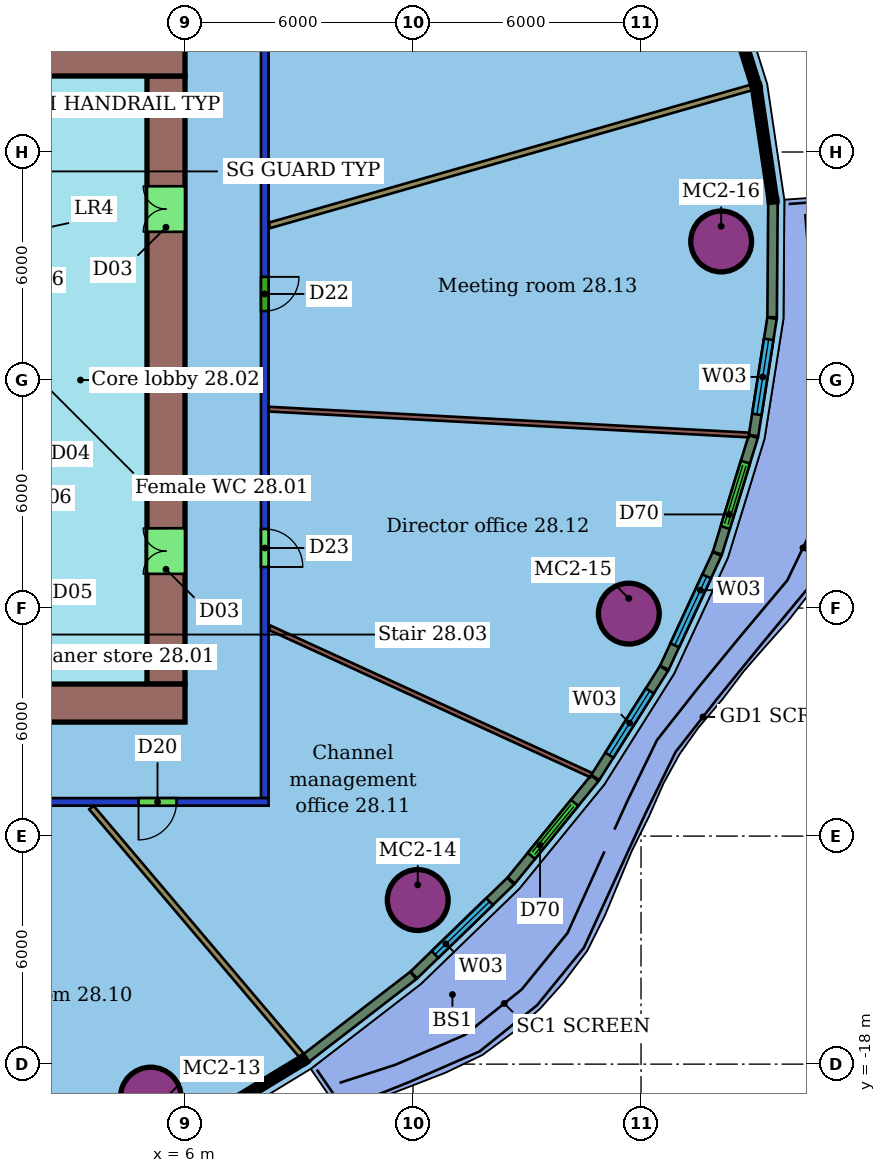
"""IFC4 building model, lengths in metres.
Left out: names, types, materials, properties, quantities, classifications, styles, units other than length and angle.
Written with IfcOpenShell. Run it as: python <this file> out.ifc"""

import sys

from ifc_helpers import new_model, si_unit, direction, frame, frame_2d, origin, origin_2d, place, context, subcontext, project, spatial, rectangle, hollow_circle, extrude, element, fill, save


model = new_model("IFC4")
c1 = context("Model", 3, precision=1e-05, world=origin(), true_north=direction((0.0, 1.0)))
c2 = subcontext(c1, "Body", "Model", "MODEL_VIEW")
j1 = project(units=[si_unit("LENGTHUNIT", "METRE"), si_unit("PLANEANGLEUNIT", "RADIAN")], contexts=[c1])
p1 = place(None, origin())
s1 = spatial("IfcSite", under=j1, at=p1, CompositionType="ELEMENT")
p2 = place(p1, origin())
s2 = spatial("IfcBuilding", under=s1, at=p2, CompositionType="ELEMENT")
p3 = place(p2, frame((0.0, 0.0, 121.0)))
s3 = spatial("IfcBuildingStorey", under=s2, at=p3, CompositionType="ELEMENT", Elevation=121.0)
for number, where, z_axis, x_axis in (
    (1, (5.1, -18.881, 0.0), (0.0, 0.0, 1.0), (1.0, 0.0, 0.0)),
    (2, (12.125, -13.683, 0.0), (0.0, 0.0, 1.0), (1.0, 0.0, 0.0)),
    (3, (17.679, -6.146, 0.0), (0.0, 0.0, 1.0), (1.0, 0.0, 0.0)),
    (4, (20.109, 3.646, 0.0), (0.0, 0.0, 1.0), (1.0, 0.0, 0.0)),
):
    element("IfcColumn", number, at=place(p3, frame(where, z_axis=z_axis, x_axis=x_axis)), inside=s3, PredefinedType="COLUMN", context=c2, shape_type="SweptSolid", body=[
        extrude(hollow_circle(Radius=0.8, WallThickness=0.055, at=origin_2d()), origin(), (0.0, 0.0, 1.0), 3.45),
    ])
p4 = place(p3, frame((8.2, -11.1, 0.0), z_axis=(0.0, 0.0, 1.0), x_axis=(-1.0, 0.0, 0.0)))
e5 = element("IfcWall", 5, at=p4, inside=s3, PredefinedType="PARTITIONING", context=c2, shape_type="SweptSolid", body=[
    extrude(rectangle(XDim=28.4, YDim=0.2, at=frame_2d((14.2, 0.0))), origin(), (0.0, 0.0, 1.0), 3.0),
])
p5 = place(p4, frame((22.666, 0.0, 0.0)))
e6 = element("IfcOpeningElement", 6, at=p5, cuts=e5, PredefinedType="OPENING", context=c2, shape_type="SweptSolid", body=[
    extrude(rectangle(XDim=0.9, YDim=2.1, at=frame_2d((0.45, 1.05))), frame((0.0, 0.11, 0.0), z_axis=(0.0, -1.0, 0.0), x_axis=(1.0, 0.0, 0.0)), (0.0, 0.0, 1.0), 0.22),
])
p6 = place(p4, frame((17.362, 0.0, 0.0)))
e7 = element("IfcOpeningElement", 7, at=p6, cuts=e5, PredefinedType="OPENING", context=c2, shape_type="SweptSolid", body=[
    extrude(rectangle(XDim=1.8, YDim=2.4, at=frame_2d((0.9, 1.2))), frame((0.0, 0.11, 0.0), z_axis=(0.0, -1.0, 0.0), x_axis=(1.0, 0.0, 0.0)), (0.0, 0.0, 1.0), 0.22),
])
p7 = place(p4, frame((12.592, 0.0, 0.0)))
e8 = element("IfcOpeningElement", 8, at=p7, cuts=e5, PredefinedType="OPENING", context=c2, shape_type="SweptSolid", body=[
    extrude(rectangle(XDim=0.9, YDim=2.1, at=frame_2d((0.45, 1.05))), frame((0.0, 0.11, 0.0), z_axis=(0.0, -1.0, 0.0), x_axis=(1.0, 0.0, 0.0)), (0.0, 0.0, 1.0), 0.22),
])
p8 = place(p4, frame((6.504, 0.0, 0.0)))
e9 = element("IfcOpeningElement", 9, at=p8, cuts=e5, PredefinedType="OPENING", context=c2, shape_type="SweptSolid", body=[
    extrude(rectangle(XDim=1.5, YDim=2.1, at=frame_2d((0.75, 1.05))), frame((0.0, 0.11, 0.0), z_axis=(0.0, -1.0, 0.0), x_axis=(1.0, 0.0, 0.0)), (0.0, 0.0, 1.0), 0.22),
])
p9 = place(p4, frame((2.423, 0.0, 0.0)))
e10 = element("IfcOpeningElement", 10, at=p9, cuts=e5, PredefinedType="OPENING", context=c2, shape_type="SweptSolid", body=[
    extrude(rectangle(XDim=1.0, YDim=2.1, at=frame_2d((0.5, 1.05))), frame((0.0, 0.11, 0.0), z_axis=(0.0, -1.0, 0.0), x_axis=(1.0, 0.0, 0.0)), (0.0, 0.0, 1.0), 0.22),
])
p10 = place(p3, frame((8.1, 11.0, 0.0), z_axis=(0.0, 0.0, 1.0), x_axis=(0.0, -1.0, 0.0)))
e11 = element("IfcWall", 11, at=p10, inside=s3, PredefinedType="PARTITIONING", context=c2, shape_type="SweptSolid", body=[
    extrude(rectangle(XDim=22.0, YDim=0.2, at=frame_2d((11.0, 0.0))), origin(), (0.0, 0.0, 1.0), 3.0),
])
p11 = place(p10, frame((14.919, 0.0, 0.0)))
e12 = element("IfcOpeningElement", 12, at=p11, cuts=e11, PredefinedType="OPENING", context=c2, shape_type="SweptSolid", body=[
    extrude(rectangle(XDim=1.0, YDim=2.4, at=frame_2d((0.5, 1.2))), frame((0.0, 0.11, 0.0), z_axis=(0.0, -1.0, 0.0), x_axis=(1.0, 0.0, 0.0)), (0.0, 0.0, 1.0), 0.22),
])
p12 = place(p10, frame((8.285, 0.0, 0.0)))
e13 = element("IfcOpeningElement", 13, at=p12, cuts=e11, PredefinedType="OPENING", context=c2, shape_type="SweptSolid", body=[
    extrude(rectangle(XDim=0.9, YDim=2.1, at=frame_2d((0.45, 1.05))), frame((0.0, 0.11, 0.0), z_axis=(0.0, -1.0, 0.0), x_axis=(1.0, 0.0, 0.0)), (0.0, 0.0, 1.0), 0.22),
])
p13 = place(p3, frame((9.069, -17.774, 0.0), z_axis=(0.0, 0.0, 1.0), x_axis=(-0.646671174143, 0.762768898509, 0.0)))
e14 = element("IfcWall", 14, at=p13, inside=s3, PredefinedType="PARTITIONING", context=c2, shape_type="SweptSolid", body=[
    extrude(rectangle(XDim=8.554, YDim=0.15, at=frame_2d((4.277, 0.0))), origin(), (0.0, 0.0, 1.0), 3.45),
])
p14 = place(p3, frame((16.688, -10.395, 0.0), z_axis=(0.0, 0.0, 1.0), x_axis=(-0.909112835196, 0.416549940443, 0.0)))
e15 = element("IfcWall", 15, at=p14, inside=s3, PredefinedType="PARTITIONING", context=c2, shape_type="SweptSolid", body=[
    extrude(rectangle(XDim=9.308, YDim=0.125, at=frame_2d((4.654, 0.0))), origin(), (0.0, 0.0, 1.0), 3.45),
])
p15 = place(p3, frame((20.836, -1.446, 0.0), z_axis=(0.0, 0.0, 1.0), x_axis=(-0.998551591067, 0.053802601961, 0.0)))
e16 = element("IfcWall", 16, at=p15, inside=s3, PredefinedType="PARTITIONING", context=c2, shape_type="SweptSolid", body=[
    extrude(rectangle(XDim=12.651, YDim=0.125, at=frame_2d((6.326, 0.0))), origin(), (0.0, 0.0, 1.0), 3.45),
])
p16 = place(p3, frame((20.905, 7.698, 0.0), z_axis=(0.0, 0.0, 1.0), x_axis=(-0.961416334636, -0.275097494528, 0.0)))
e17 = element("IfcWall", 17, at=p16, inside=s3, PredefinedType="PARTITIONING", context=c2, shape_type="SweptSolid", body=[
    extrude(rectangle(XDim=13.193, YDim=0.15, at=frame_2d((6.597, 0.0))), origin(), (0.0, 0.0, 1.0), 3.45),
])
p17 = place(p3, frame((9.183, -17.843, 0.0), z_axis=(0.0, 0.0, 1.0), x_axis=(0.792037804, 0.610472044433, 0.0)))
e18 = element("IfcWall", 18, at=p17, inside=s3, PredefinedType="SOLIDWALL", context=c2, shape_type="SweptSolid", body=[
    extrude(rectangle(XDim=3.563, YDim=0.25, at=frame_2d((1.782, 0.0))), origin(), (0.0, 0.0, 1.0), 3.05),
])
p18 = place(p3, frame((12.022, -15.653, 0.0), z_axis=(0.0, 0.0, 1.0), x_axis=(0.718334776763, 0.695697598453, 0.0)))
e19 = element("IfcWall", 19, at=p18, inside=s3, PredefinedType="SOLIDWALL", context=c2, shape_type="SweptSolid", body=[
    extrude(rectangle(XDim=3.548, YDim=0.25, at=frame_2d((1.774, 0.0))), origin(), (0.0, 0.0, 1.0), 3.05),
])
p19 = place(p18, frame((0.774, 0.0, 0.9)))
e20 = element("IfcOpeningElement", 20, at=p19, cuts=e19, PredefinedType="OPENING", context=c2, shape_type="SweptSolid", body=[
    extrude(rectangle(XDim=2.0, YDim=2.1, at=frame_2d((1.0, 1.05))), frame((0.0, 0.135, 0.0), z_axis=(0.0, -1.0, 0.0), x_axis=(1.0, 0.0, 0.0)), (0.0, 0.0, 1.0), 0.27),
])
p20 = place(p3, frame((14.586, -13.168, 0.0), z_axis=(0.0, 0.0, 1.0), x_axis=(0.632318819386, 0.774708274546, 0.0)))
e21 = element("IfcWall", 21, at=p20, inside=s3, PredefinedType="SOLIDWALL", context=c2, shape_type="SweptSolid", body=[
    extrude(rectangle(XDim=3.474, YDim=0.25, at=frame_2d((1.737, 0.0))), origin(), (0.0, 0.0, 1.0), 3.05),
])
p21 = place(p20, frame((0.837, 0.0, 0.0)))
e22 = element("IfcOpeningElement", 22, at=p21, cuts=e21, PredefinedType="OPENING", context=c2, shape_type="SweptSolid", body=[
    extrude(rectangle(XDim=1.8, YDim=2.4, at=frame_2d((0.9, 1.2))), frame((0.0, 0.135, 0.0), z_axis=(0.0, -1.0, 0.0), x_axis=(1.0, 0.0, 0.0)), (0.0, 0.0, 1.0), 0.27),
])
p22 = place(p3, frame((16.796, -10.458, 0.0), z_axis=(0.0, 0.0, 1.0), x_axis=(0.533187726109, 0.845996955506, 0.0)))
e23 = element("IfcWall", 23, at=p22, inside=s3, PredefinedType="SOLIDWALL", context=c2, shape_type="SweptSolid", body=[
    extrude(rectangle(XDim=3.389, YDim=0.25, at=frame_2d((1.694, 0.0))), origin(), (0.0, 0.0, 1.0), 3.05),
])
p23 = place(p22, frame((0.695, 0.0, 0.9)))
e24 = element("IfcOpeningElement", 24, at=p23, cuts=e23, PredefinedType="OPENING", context=c2, shape_type="SweptSolid", body=[
    extrude(rectangle(XDim=2.0, YDim=2.1, at=frame_2d((1.0, 1.05))), frame((0.0, 0.135, 0.0), z_axis=(0.0, -1.0, 0.0), x_axis=(1.0, 0.0, 0.0)), (0.0, 0.0, 1.0), 0.27),
])
p24 = place(p3, frame((18.614, -7.57, 0.0), z_axis=(0.0, 0.0, 1.0), x_axis=(0.420461012784, 0.907310606534, 0.0)))
e25 = element("IfcWall", 25, at=p24, inside=s3, PredefinedType="SOLIDWALL", context=c2, shape_type="SweptSolid", body=[
    extrude(rectangle(XDim=3.299, YDim=0.25, at=frame_2d((1.649, 0.0))), origin(), (0.0, 0.0, 1.0), 3.05),
])
p25 = place(p24, frame((0.649, 0.0, 0.9)))
e26 = element("IfcOpeningElement", 26, at=p25, cuts=e25, PredefinedType="OPENING", context=c2, shape_type="SweptSolid", body=[
    extrude(rectangle(XDim=2.0, YDim=2.1, at=frame_2d((1.0, 1.05))), frame((0.0, 0.135, 0.0), z_axis=(0.0, -1.0, 0.0), x_axis=(1.0, 0.0, 0.0)), (0.0, 0.0, 1.0), 0.27),
])
p26 = place(p3, frame((20.01, -4.554, 0.0), z_axis=(0.0, 0.0, 1.0), x_axis=(0.294326394651, 0.955704961488, 0.0)))
e27 = element("IfcWall", 27, at=p26, inside=s3, PredefinedType="SOLIDWALL", context=c2, shape_type="SweptSolid", body=[
    extrude(rectangle(XDim=3.209, YDim=0.25, at=frame_2d((1.604, 0.0))), origin(), (0.0, 0.0, 1.0), 3.05),
])
p27 = place(p26, frame((0.705, 0.0, 0.0)))
e28 = element("IfcOpeningElement", 28, at=p27, cuts=e27, PredefinedType="OPENING", context=c2, shape_type="SweptSolid", body=[
    extrude(rectangle(XDim=1.8, YDim=2.4, at=frame_2d((0.9, 1.2))), frame((0.0, 0.135, 0.0), z_axis=(0.0, -1.0, 0.0), x_axis=(1.0, 0.0, 0.0)), (0.0, 0.0, 1.0), 0.27),
])
p28 = place(p3, frame((20.96, -1.461, 0.0), z_axis=(0.0, 0.0, 1.0), x_axis=(0.155782128251, 0.987791439788, 0.0)))
e29 = element("IfcWall", 29, at=p28, inside=s3, PredefinedType="SOLIDWALL", context=c2, shape_type="SweptSolid", body=[
    extrude(rectangle(XDim=3.126, YDim=0.25, at=frame_2d((1.563, 0.0))), origin(), (0.0, 0.0, 1.0), 3.05),
])
p29 = place(p28, frame((0.563, 0.0, 0.9)))
e30 = element("IfcOpeningElement", 30, at=p29, cuts=e29, PredefinedType="OPENING", context=c2, shape_type="SweptSolid", body=[
    extrude(rectangle(XDim=2.0, YDim=2.1, at=frame_2d((1.0, 1.05))), frame((0.0, 0.135, 0.0), z_axis=(0.0, -1.0, 0.0), x_axis=(1.0, 0.0, 0.0)), (0.0, 0.0, 1.0), 0.27),
])
p30 = place(p3, frame((21.449, 1.653, 0.0), z_axis=(0.0, 0.0, 1.0), x_axis=(0.007366431712, 0.999972867474, 0.0)))
e31 = element("IfcWall", 31, at=p30, inside=s3, PredefinedType="SOLIDWALL", context=c2, shape_type="SweptSolid", body=[
    extrude(rectangle(XDim=3.016, YDim=0.25, at=frame_2d((1.508, 0.0))), origin(), (0.0, 0.0, 1.0), 3.05),
])
p31 = place(p3, frame((6.0, 8.5, 0.0), z_axis=(0.0, 0.0, 1.0), x_axis=(-1.0, 0.0, 0.0)))
e32 = element("IfcWall", 32, at=p31, inside=s3, PredefinedType="SHEAR", context=c2, shape_type="SweptSolid", body=[
    extrude(rectangle(XDim=12.0, YDim=1.0, at=frame_2d((6.0, 0.0))), origin(), (0.0, 0.0, 1.0), 3.3),
])
p32 = place(p31, frame((5.6, 0.0, 0.0)))
e33 = element("IfcOpeningElement", 33, at=p32, cuts=e32, PredefinedType="OPENING", context=c2, shape_type="SweptSolid", body=[
    extrude(rectangle(XDim=1.2, YDim=2.1, at=frame_2d((0.6, 1.05))), frame((0.0, 0.51, 0.0), z_axis=(0.0, -1.0, 0.0), x_axis=(1.0, 0.0, 0.0)), (0.0, 0.0, 1.0), 1.02),
])
p33 = place(p3, frame((-18.0, -8.5, 0.0), z_axis=(0.0, 0.0, 1.0), x_axis=(1.0, 0.0, 0.0)))
e34 = element("IfcWall", 34, at=p33, inside=s3, PredefinedType="SHEAR", context=c2, shape_type="SweptSolid", body=[
    extrude(rectangle(XDim=24.0, YDim=1.0, at=frame_2d((12.0, 0.0))), origin(), (0.0, 0.0, 1.0), 3.3),
])
p34 = place(p33, frame((6.0, 0.0, 0.0)))
e35 = element("IfcOpeningElement", 35, at=p34, cuts=e34, PredefinedType="OPENING", context=c2, shape_type="SweptSolid", body=[
    extrude(rectangle(XDim=1.2, YDim=2.1, at=frame_2d((0.6, 1.05))), frame((0.0, 0.51, 0.0), z_axis=(0.0, -1.0, 0.0), x_axis=(1.0, 0.0, 0.0)), (0.0, 0.0, 1.0), 1.02),
])
p35 = place(p3, frame((5.5, -8.0, 0.0), z_axis=(0.0, 0.0, 1.0), x_axis=(0.0, 1.0, 0.0)))
e36 = element("IfcWall", 36, at=p35, inside=s3, PredefinedType="SHEAR", context=c2, shape_type="SweptSolid", body=[
    extrude(rectangle(XDim=16.0, YDim=1.0, at=frame_2d((8.0, 0.0))), origin(), (0.0, 0.0, 1.0), 3.3),
])
p36 = place(p35, frame((2.9, 0.0, 0.0)))
e37 = element("IfcOpeningElement", 37, at=p36, cuts=e36, PredefinedType="OPENING", context=c2, shape_type="SweptSolid", body=[
    extrude(rectangle(XDim=1.2, YDim=2.1, at=frame_2d((0.6, 1.05))), frame((0.0, 0.51, 0.0), z_axis=(0.0, -1.0, 0.0), x_axis=(1.0, 0.0, 0.0)), (0.0, 0.0, 1.0), 1.02),
])
p37 = place(p35, frame((11.9, 0.0, 0.0)))
e38 = element("IfcOpeningElement", 38, at=p37, cuts=e36, PredefinedType="OPENING", context=c2, shape_type="SweptSolid", body=[
    extrude(rectangle(XDim=1.2, YDim=2.1, at=frame_2d((0.6, 1.05))), frame((0.0, 0.51, 0.0), z_axis=(0.0, -1.0, 0.0), x_axis=(1.0, 0.0, 0.0)), (0.0, 0.0, 1.0), 1.02),
])
p38 = place(p9, origin())
e39 = element("IfcDoor", 39, at=p38, inside=s3, OperationType="SINGLE_SWING_RIGHT", PredefinedType="DOOR", context=c2, shape_type="SweptSolid", body=[
    extrude(rectangle(XDim=1.0, YDim=2.1, at=frame_2d((0.5, 1.05))), frame((0.0, 0.025, 0.0), z_axis=(0.0, -1.0, 0.0), x_axis=(1.0, 0.0, 0.0)), (0.0, 0.0, 1.0), 0.05),
])
fill(e10, e39)
p39 = place(p11, origin())
e40 = element("IfcDoor", 40, at=p39, inside=s3, OperationType="SINGLE_SWING_RIGHT", PredefinedType="DOOR", context=c2, shape_type="SweptSolid", body=[
    extrude(rectangle(XDim=1.0, YDim=2.4, at=frame_2d((0.5, 1.2))), frame((0.0, 0.025, 0.0), z_axis=(0.0, -1.0, 0.0), x_axis=(1.0, 0.0, 0.0)), (0.0, 0.0, 1.0), 0.05),
])
fill(e12, e40)
p40 = place(p12, origin())
e41 = element("IfcDoor", 41, at=p40, inside=s3, OperationType="SINGLE_SWING_LEFT", PredefinedType="DOOR", context=c2, shape_type="SweptSolid", body=[
    extrude(rectangle(XDim=0.9, YDim=2.1, at=frame_2d((0.45, 1.05))), frame((0.0, 0.025, 0.0), z_axis=(0.0, -1.0, 0.0), x_axis=(1.0, 0.0, 0.0)), (0.0, 0.0, 1.0), 0.05),
])
fill(e13, e41)
p41 = place(p19, origin())
e42 = element("IfcWindow", 42, at=p41, inside=s3, PartitioningType="SINGLE_PANEL", PredefinedType="WINDOW", context=c2, shape_type="SweptSolid", body=[
    extrude(rectangle(XDim=2.0, YDim=2.1, at=frame_2d((1.0, 1.05))), frame((0.0, 0.03, 0.0), z_axis=(0.0, -1.0, 0.0), x_axis=(1.0, 0.0, 0.0)), (0.0, 0.0, 1.0), 0.06),
])
fill(e20, e42)
p42 = place(p21, origin())
e43 = element("IfcDoor", 43, at=p42, inside=s3, OperationType="DOUBLE_DOOR_SLIDING", PredefinedType="DOOR", context=c2, shape_type="SweptSolid", body=[
    extrude(rectangle(XDim=1.8, YDim=2.4, at=frame_2d((0.9, 1.2))), frame((0.0, 0.025, 0.0), z_axis=(0.0, -1.0, 0.0), x_axis=(1.0, 0.0, 0.0)), (0.0, 0.0, 1.0), 0.05),
])
fill(e22, e43)
p43 = place(p23, origin())
e44 = element("IfcWindow", 44, at=p43, inside=s3, PartitioningType="SINGLE_PANEL", PredefinedType="WINDOW", context=c2, shape_type="SweptSolid", body=[
    extrude(rectangle(XDim=2.0, YDim=2.1, at=frame_2d((1.0, 1.05))), frame((0.0, 0.03, 0.0), z_axis=(0.0, -1.0, 0.0), x_axis=(1.0, 0.0, 0.0)), (0.0, 0.0, 1.0), 0.06),
])
fill(e24, e44)
p44 = place(p25, origin())
e45 = element("IfcWindow", 45, at=p44, inside=s3, PartitioningType="SINGLE_PANEL", PredefinedType="WINDOW", context=c2, shape_type="SweptSolid", body=[
    extrude(rectangle(XDim=2.0, YDim=2.1, at=frame_2d((1.0, 1.05))), frame((0.0, 0.03, 0.0), z_axis=(0.0, -1.0, 0.0), x_axis=(1.0, 0.0, 0.0)), (0.0, 0.0, 1.0), 0.06),
])
fill(e26, e45)
p45 = place(p27, origin())
e46 = element("IfcDoor", 46, at=p45, inside=s3, OperationType="DOUBLE_DOOR_SLIDING", PredefinedType="DOOR", context=c2, shape_type="SweptSolid", body=[
    extrude(rectangle(XDim=1.8, YDim=2.4, at=frame_2d((0.9, 1.2))), frame((0.0, 0.025, 0.0), z_axis=(0.0, -1.0, 0.0), x_axis=(1.0, 0.0, 0.0)), (0.0, 0.0, 1.0), 0.05),
])
fill(e28, e46)
p46 = place(p29, origin())
e47 = element("IfcWindow", 47, at=p46, inside=s3, PartitioningType="SINGLE_PANEL", PredefinedType="WINDOW", context=c2, shape_type="SweptSolid", body=[
    extrude(rectangle(XDim=2.0, YDim=2.1, at=frame_2d((1.0, 1.05))), frame((0.0, 0.03, 0.0), z_axis=(0.0, -1.0, 0.0), x_axis=(1.0, 0.0, 0.0)), (0.0, 0.0, 1.0), 0.06),
])
fill(e30, e47)
p47 = place(p36, origin())
e48 = element("IfcDoor", 48, at=p47, inside=s3, OperationType="DOUBLE_DOOR_SINGLE_SWING", PredefinedType="NOTDEFINED", context=c2, shape_type="SweptSolid", body=[
    extrude(rectangle(XDim=1.2, YDim=2.1, at=frame_2d((0.6, 1.05))), frame((0.0, 0.025, 0.0), z_axis=(0.0, -1.0, 0.0), x_axis=(1.0, 0.0, 0.0)), (0.0, 0.0, 1.0), 0.05),
])
fill(e37, e48)
p48 = place(p37, origin())
e49 = element("IfcDoor", 49, at=p48, inside=s3, OperationType="DOUBLE_DOOR_SINGLE_SWING", PredefinedType="NOTDEFINED", context=c2, shape_type="SweptSolid", body=[
    extrude(rectangle(XDim=1.2, YDim=2.1, at=frame_2d((0.6, 1.05))), frame((0.0, 0.025, 0.0), z_axis=(0.0, -1.0, 0.0), x_axis=(1.0, 0.0, 0.0)), (0.0, 0.0, 1.0), 0.05),
])
fill(e38, e49)
save(model, sys.argv[1])
